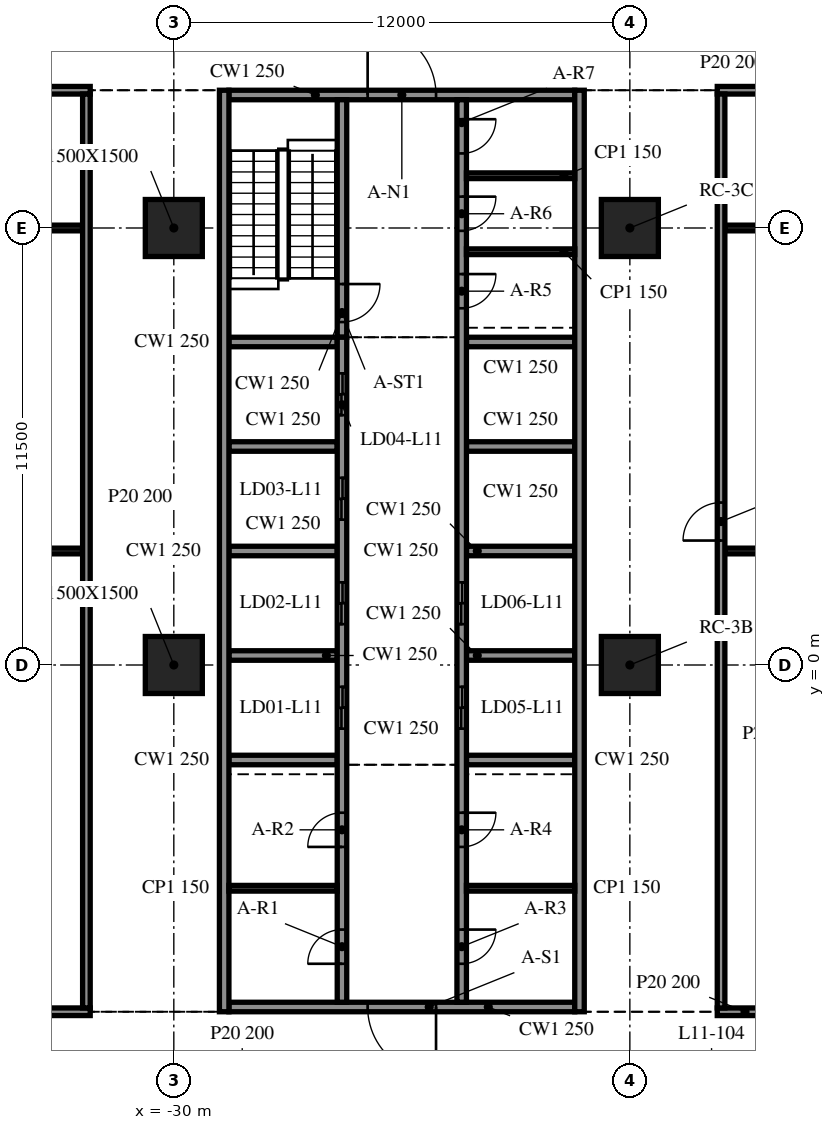
"""IFC4 building model, lengths in metres.
Left out: names, types, materials, properties, quantities, classifications, styles, units other than length and angle.
Written with IfcOpenShell. Run it as: python <this file> out.ifc"""

import sys

from ifc_helpers import new_model, si_unit, direction, frame, frame_2d, origin, origin_2d, place, context, subcontext, project, spatial, rectangle, extrude, element, fill, save


model = new_model("IFC4")
c1 = context("Model", 3, precision=1e-05, world=origin(), true_north=direction((0.0, 1.0)))
c2 = subcontext(c1, "Body", "Model", "MODEL_VIEW")
j1 = project(units=[si_unit("LENGTHUNIT", "METRE"), si_unit("PLANEANGLEUNIT", "RADIAN")], contexts=[c1])
p1 = place(None, origin())
s1 = spatial("IfcSite", under=j1, at=p1, CompositionType="ELEMENT")
p2 = place(p1, origin())
s2 = spatial("IfcBuilding", under=s1, at=p2, CompositionType="ELEMENT")
p3 = place(p2, frame((0.0, 0.0, 50.3)))
s3 = spatial("IfcBuildingStorey", under=s2, at=p3, CompositionType="ELEMENT", Elevation=50.3)
for number, where, z_axis, x_axis in (
    (1, (-30.0, 0.0, -0.34), (0.0, 0.0, 1.0), (1.0, 0.0, 0.0)),
    (2, (-30.0, 11.5, -0.34), (0.0, 0.0, 1.0), (1.0, 0.0, 0.0)),
    (3, (-18.0, 0.0, -0.34), (0.0, 0.0, 1.0), (1.0, 0.0, 0.0)),
    (4, (-18.0, 11.5, -0.34), (0.0, 0.0, 1.0), (1.0, 0.0, 0.0)),
):
    element("IfcColumn", number, at=place(p3, frame(where, z_axis=z_axis, x_axis=x_axis)), inside=s3, PredefinedType="COLUMN", context=c2, shape_type="SweptSolid", body=[
        extrude(rectangle(XDim=1.5, YDim=1.5, at=origin_2d()), origin(), (0.0, 0.0, 1.0), 4.3),
    ])
for number, where, z_axis, x_axis in (
    (5, (-28.675, 15.125, 0.0), (0.0, 0.0, 1.0), (0.0, -1.0, 0.0)),
    (6, (-19.325, -9.125, 0.0), (0.0, 0.0, 1.0), (0.0, 1.0, 0.0)),
):
    element("IfcWall", number, at=place(p3, frame(where, z_axis=z_axis, x_axis=x_axis)), inside=s3, PredefinedType="SOLIDWALL", context=c2, shape_type="SweptSolid", body=[
        extrude(rectangle(XDim=24.25, YDim=0.25, at=frame_2d((12.125, 0.0))), origin(), (0.0, 0.0, 1.0), 3.96),
    ])
p4 = place(p3, frame((-19.45, -9.0, 0.0), z_axis=(0.0, 0.0, 1.0), x_axis=(-1.0, 0.0, 0.0)))
e7 = element("IfcWall", 7, at=p4, inside=s3, PredefinedType="SOLIDWALL", context=c2, shape_type="SweptSolid", body=[
    extrude(rectangle(XDim=9.1, YDim=0.25, at=frame_2d((4.55, 0.0))), origin(), (0.0, 0.0, 1.0), 3.96),
])
p5 = place(p4, frame((3.65, 0.0, 0.0)))
e8 = element("IfcOpeningElement", 8, at=p5, cuts=e7, PredefinedType="OPENING", context=c2, shape_type="SweptSolid", body=[
    extrude(rectangle(XDim=1.8, YDim=2.1, at=frame_2d((0.9, 1.05))), frame((0.0, 0.135, 0.0), z_axis=(0.0, -1.0, 0.0), x_axis=(1.0, 0.0, 0.0)), (0.0, 0.0, 1.0), 0.27),
])
p6 = place(p3, frame((-28.55, 15.0, 0.0), z_axis=(0.0, 0.0, 1.0), x_axis=(1.0, 0.0, 0.0)))
e9 = element("IfcWall", 9, at=p6, inside=s3, PredefinedType="SOLIDWALL", context=c2, shape_type="SweptSolid", body=[
    extrude(rectangle(XDim=9.1, YDim=0.25, at=frame_2d((4.55, 0.0))), origin(), (0.0, 0.0, 1.0), 3.96),
])
p7 = place(p6, frame((3.65, 0.0, 0.0)))
e10 = element("IfcOpeningElement", 10, at=p7, cuts=e9, PredefinedType="OPENING", context=c2, shape_type="SweptSolid", body=[
    extrude(rectangle(XDim=1.8, YDim=2.1, at=frame_2d((0.9, 1.05))), frame((0.0, 0.135, 0.0), z_axis=(0.0, -1.0, 0.0), x_axis=(1.0, 0.0, 0.0)), (0.0, 0.0, 1.0), 0.27),
])
p8 = place(p3, frame((-25.575, -8.875, 0.0), z_axis=(0.0, 0.0, 1.0), x_axis=(0.0, 1.0, 0.0)))
e11 = element("IfcWall", 11, at=p8, inside=s3, PredefinedType="SOLIDWALL", context=c2, shape_type="SweptSolid", body=[
    extrude(rectangle(XDim=17.5, YDim=0.25, at=frame_2d((8.75, 0.0))), origin(), (0.0, 0.0, 1.0), 3.96),
])
p9 = place(p8, frame((7.2, 0.0, 0.0)))
e12 = element("IfcOpeningElement", 12, at=p9, cuts=e11, PredefinedType="OPENING", context=c2, shape_type="SweptSolid", body=[
    extrude(rectangle(XDim=1.1, YDim=2.1, at=frame_2d((0.55, 1.05))), frame((0.0, 0.135, 0.0), z_axis=(0.0, -1.0, 0.0), x_axis=(1.0, 0.0, 0.0)), (0.0, 0.0, 1.0), 0.27),
])
p10 = place(p8, frame((9.95, 0.0, 0.0)))
e13 = element("IfcOpeningElement", 13, at=p10, cuts=e11, PredefinedType="OPENING", context=c2, shape_type="SweptSolid", body=[
    extrude(rectangle(XDim=1.1, YDim=2.1, at=frame_2d((0.55, 1.05))), frame((0.0, 0.135, 0.0), z_axis=(0.0, -1.0, 0.0), x_axis=(1.0, 0.0, 0.0)), (0.0, 0.0, 1.0), 0.27),
])
p11 = place(p8, frame((12.7, 0.0, 0.0)))
e14 = element("IfcOpeningElement", 14, at=p11, cuts=e11, PredefinedType="OPENING", context=c2, shape_type="SweptSolid", body=[
    extrude(rectangle(XDim=1.1, YDim=2.1, at=frame_2d((0.55, 1.05))), frame((0.0, 0.135, 0.0), z_axis=(0.0, -1.0, 0.0), x_axis=(1.0, 0.0, 0.0)), (0.0, 0.0, 1.0), 0.27),
])
p12 = place(p8, frame((15.45, 0.0, 0.0)))
e15 = element("IfcOpeningElement", 15, at=p12, cuts=e11, PredefinedType="OPENING", context=c2, shape_type="SweptSolid", body=[
    extrude(rectangle(XDim=1.1, YDim=2.1, at=frame_2d((0.55, 1.05))), frame((0.0, 0.135, 0.0), z_axis=(0.0, -1.0, 0.0), x_axis=(1.0, 0.0, 0.0)), (0.0, 0.0, 1.0), 0.27),
])
p13 = place(p8, frame((1.012, 0.0, 0.0)))
e16 = element("IfcOpeningElement", 16, at=p13, cuts=e11, PredefinedType="OPENING", context=c2, shape_type="SweptSolid", body=[
    extrude(rectangle(XDim=0.9, YDim=2.1, at=frame_2d((0.45, 1.05))), frame((0.0, 0.135, 0.0), z_axis=(0.0, -1.0, 0.0), x_axis=(1.0, 0.0, 0.0)), (0.0, 0.0, 1.0), 0.27),
])
p14 = place(p8, frame((4.087, 0.0, 0.0)))
e17 = element("IfcOpeningElement", 17, at=p14, cuts=e11, PredefinedType="OPENING", context=c2, shape_type="SweptSolid", body=[
    extrude(rectangle(XDim=0.9, YDim=2.1, at=frame_2d((0.45, 1.05))), frame((0.0, 0.135, 0.0), z_axis=(0.0, -1.0, 0.0), x_axis=(1.0, 0.0, 0.0)), (0.0, 0.0, 1.0), 0.27),
])
p15 = place(p3, frame((-25.575, 14.875, 0.0), z_axis=(0.0, 0.0, 1.0), x_axis=(0.0, -1.0, 0.0)))
e18 = element("IfcWall", 18, at=p15, inside=s3, PredefinedType="SOLIDWALL", context=c2, shape_type="SweptSolid", body=[
    extrude(rectangle(XDim=6.25, YDim=0.25, at=frame_2d((3.125, 0.0))), origin(), (0.0, 0.0, 1.0), 3.96),
])
p16 = place(p15, frame((4.85, 0.0, 0.0)))
e19 = element("IfcOpeningElement", 19, at=p16, cuts=e18, PredefinedType="OPENING", context=c2, shape_type="SweptSolid", body=[
    extrude(rectangle(XDim=1.0, YDim=2.1, at=frame_2d((0.5, 1.05))), frame((0.0, 0.135, 0.0), z_axis=(0.0, -1.0, 0.0), x_axis=(1.0, 0.0, 0.0)), (0.0, 0.0, 1.0), 0.27),
])
p17 = place(p3, frame((-22.425, 14.875, 0.0), z_axis=(0.0, 0.0, 1.0), x_axis=(0.0, -1.0, 0.0)))
e20 = element("IfcWall", 20, at=p17, inside=s3, PredefinedType="SOLIDWALL", context=c2, shape_type="SweptSolid", body=[
    extrude(rectangle(XDim=23.75, YDim=0.25, at=frame_2d((11.875, 0.0))), origin(), (0.0, 0.0, 1.0), 3.96),
])
p18 = place(p17, frame((15.45, 0.0, 0.0)))
e21 = element("IfcOpeningElement", 21, at=p18, cuts=e20, PredefinedType="OPENING", context=c2, shape_type="SweptSolid", body=[
    extrude(rectangle(XDim=1.1, YDim=2.1, at=frame_2d((0.55, 1.05))), frame((0.0, 0.135, 0.0), z_axis=(0.0, -1.0, 0.0), x_axis=(1.0, 0.0, 0.0)), (0.0, 0.0, 1.0), 0.27),
])
p19 = place(p17, frame((12.7, 0.0, 0.0)))
e22 = element("IfcOpeningElement", 22, at=p19, cuts=e20, PredefinedType="OPENING", context=c2, shape_type="SweptSolid", body=[
    extrude(rectangle(XDim=1.1, YDim=2.1, at=frame_2d((0.55, 1.05))), frame((0.0, 0.135, 0.0), z_axis=(0.0, -1.0, 0.0), x_axis=(1.0, 0.0, 0.0)), (0.0, 0.0, 1.0), 0.27),
])
p20 = place(p17, frame((21.837, 0.0, 0.0)))
e23 = element("IfcOpeningElement", 23, at=p20, cuts=e20, PredefinedType="OPENING", context=c2, shape_type="SweptSolid", body=[
    extrude(rectangle(XDim=0.9, YDim=2.1, at=frame_2d((0.45, 1.05))), frame((0.0, 0.135, 0.0), z_axis=(0.0, -1.0, 0.0), x_axis=(1.0, 0.0, 0.0)), (0.0, 0.0, 1.0), 0.27),
])
p21 = place(p17, frame((18.762, 0.0, 0.0)))
e24 = element("IfcOpeningElement", 24, at=p21, cuts=e20, PredefinedType="OPENING", context=c2, shape_type="SweptSolid", body=[
    extrude(rectangle(XDim=0.9, YDim=2.1, at=frame_2d((0.45, 1.05))), frame((0.0, 0.135, 0.0), z_axis=(0.0, -1.0, 0.0), x_axis=(1.0, 0.0, 0.0)), (0.0, 0.0, 1.0), 0.27),
])
p22 = place(p17, frame((4.587, 0.0, 0.0)))
e25 = element("IfcOpeningElement", 25, at=p22, cuts=e20, PredefinedType="OPENING", context=c2, shape_type="SweptSolid", body=[
    extrude(rectangle(XDim=0.9, YDim=2.1, at=frame_2d((0.45, 1.05))), frame((0.0, 0.135, 0.0), z_axis=(0.0, -1.0, 0.0), x_axis=(1.0, 0.0, 0.0)), (0.0, 0.0, 1.0), 0.27),
])
p23 = place(p17, frame((2.55, 0.0, 0.0)))
e26 = element("IfcOpeningElement", 26, at=p23, cuts=e20, PredefinedType="OPENING", context=c2, shape_type="SweptSolid", body=[
    extrude(rectangle(XDim=0.9, YDim=2.1, at=frame_2d((0.45, 1.05))), frame((0.0, 0.135, 0.0), z_axis=(0.0, -1.0, 0.0), x_axis=(1.0, 0.0, 0.0)), (0.0, 0.0, 1.0), 0.27),
])
p24 = place(p17, frame((0.512, 0.0, 0.0)))
e27 = element("IfcOpeningElement", 27, at=p24, cuts=e20, PredefinedType="OPENING", context=c2, shape_type="SweptSolid", body=[
    extrude(rectangle(XDim=0.9, YDim=2.1, at=frame_2d((0.45, 1.05))), frame((0.0, 0.135, 0.0), z_axis=(0.0, -1.0, 0.0), x_axis=(1.0, 0.0, 0.0)), (0.0, 0.0, 1.0), 0.27),
])
for number, where, z_axis, x_axis in (
    (28, (-28.55, -2.5, 0.0), (0.0, 0.0, 1.0), (1.0, 0.0, 0.0)),
    (29, (-28.55, 0.25, 0.0), (0.0, 0.0, 1.0), (1.0, 0.0, 0.0)),
    (30, (-28.55, 3.0, 0.0), (0.0, 0.0, 1.0), (1.0, 0.0, 0.0)),
    (31, (-28.55, 5.75, 0.0), (0.0, 0.0, 1.0), (1.0, 0.0, 0.0)),
    (32, (-28.55, 8.5, 0.0), (0.0, 0.0, 1.0), (1.0, 0.0, 0.0)),
    (33, (-22.3, -2.5, 0.0), (0.0, 0.0, 1.0), (1.0, 0.0, 0.0)),
    (34, (-22.3, 0.25, 0.0), (0.0, 0.0, 1.0), (1.0, 0.0, 0.0)),
    (35, (-22.3, 3.0, 0.0), (0.0, 0.0, 1.0), (1.0, 0.0, 0.0)),
    (36, (-22.3, 5.75, 0.0), (0.0, 0.0, 1.0), (1.0, 0.0, 0.0)),
    (37, (-22.3, 8.5, 0.0), (0.0, 0.0, 1.0), (1.0, 0.0, 0.0)),
):
    element("IfcWall", number, at=place(p3, frame(where, z_axis=z_axis, x_axis=x_axis)), inside=s3, PredefinedType="SOLIDWALL", context=c2, shape_type="SweptSolid", body=[
        extrude(rectangle(XDim=2.85, YDim=0.25, at=frame_2d((1.425, 0.0))), origin(), (0.0, 0.0, 1.0), 3.96),
    ])
for number, where, z_axis, x_axis in (
    (38, (-28.55, -5.875, 0.0), (0.0, 0.0, 1.0), (1.0, 0.0, 0.0)),
    (39, (-22.3, -5.875, 0.0), (0.0, 0.0, 1.0), (1.0, 0.0, 0.0)),
    (40, (-22.3, 10.875, 0.0), (0.0, 0.0, 1.0), (1.0, 0.0, 0.0)),
    (41, (-22.3, 12.875, 0.0), (0.0, 0.0, 1.0), (1.0, 0.0, 0.0)),
):
    element("IfcWall", number, at=place(p3, frame(where, z_axis=z_axis, x_axis=x_axis)), inside=s3, PredefinedType="PARTITIONING", context=c2, shape_type="SweptSolid", body=[
        extrude(rectangle(XDim=2.85, YDim=0.15, at=frame_2d((1.425, 0.0))), origin(), (0.0, 0.0, 1.0), 3.96),
    ])
p25 = place(p3, frame((-39.95, -9.125, 0.0), z_axis=(0.0, 0.0, 1.0), x_axis=(1.0, 0.0, 0.0)))
e42 = element("IfcWall", 42, at=p25, inside=s3, PredefinedType="PARTITIONING", context=c2, shape_type="SweptSolid", body=[
    extrude(rectangle(XDim=7.75, YDim=0.2, at=frame_2d((3.875, 0.0))), origin(), (0.0, 0.0, 1.0), 3.96),
])
p26 = place(p25, frame((3.3, 0.0, 0.0)))
e43 = element("IfcOpeningElement", 43, at=p26, cuts=e42, PredefinedType="OPENING", context=c2, shape_type="SweptSolid", body=[
    extrude(rectangle(XDim=1.2, YDim=2.1, at=frame_2d((0.6, 1.05))), frame((0.0, 0.11, 0.0), z_axis=(0.0, -1.0, 0.0), x_axis=(1.0, 0.0, 0.0)), (0.0, 0.0, 1.0), 0.22),
])
p27 = place(p3, frame((-15.7, -9.125, 0.0), z_axis=(0.0, 0.0, 1.0), x_axis=(1.0, 0.0, 0.0)))
e44 = element("IfcWall", 44, at=p27, inside=s3, PredefinedType="PARTITIONING", context=c2, shape_type="SweptSolid", body=[
    extrude(rectangle(XDim=7.3, YDim=0.2, at=frame_2d((3.65, 0.0))), origin(), (0.0, 0.0, 1.0), 3.96),
])
p28 = place(p27, frame((3.1, 0.0, 0.0)))
e45 = element("IfcOpeningElement", 45, at=p28, cuts=e44, PredefinedType="OPENING", context=c2, shape_type="SweptSolid", body=[
    extrude(rectangle(XDim=1.0, YDim=2.1, at=frame_2d((0.5, 1.05))), frame((0.0, 0.11, 0.0), z_axis=(0.0, -1.0, 0.0), x_axis=(1.0, 0.0, 0.0)), (0.0, 0.0, 1.0), 0.22),
])
p29 = place(p3, frame((-39.75, 3.0, 0.0), z_axis=(0.0, 0.0, 1.0), x_axis=(1.0, 0.0, 0.0)))
e46 = element("IfcWall", 46, at=p29, inside=s3, PredefinedType="PARTITIONING", context=c2, shape_type="SweptSolid", body=[
    extrude(rectangle(XDim=7.35, YDim=0.15, at=frame_2d((3.675, 0.0))), origin(), (0.0, 0.0, 1.0), 3.96),
])
p30 = place(p3, frame((-15.5, 3.0, 0.0), z_axis=(0.0, 0.0, 1.0), x_axis=(1.0, 0.0, 0.0)))
e47 = element("IfcWall", 47, at=p30, inside=s3, PredefinedType="PARTITIONING", context=c2, shape_type="SweptSolid", body=[
    extrude(rectangle(XDim=6.9, YDim=0.15, at=frame_2d((3.45, 0.0))), origin(), (0.0, 0.0, 1.0), 3.96),
])
p31 = place(p3, frame((-39.75, 11.5, 0.0), z_axis=(0.0, 0.0, 1.0), x_axis=(1.0, 0.0, 0.0)))
e48 = element("IfcWall", 48, at=p31, inside=s3, PredefinedType="PARTITIONING", context=c2, shape_type="SweptSolid", body=[
    extrude(rectangle(XDim=7.35, YDim=0.15, at=frame_2d((3.675, 0.0))), origin(), (0.0, 0.0, 1.0), 3.96),
])
p32 = place(p3, frame((-15.5, 11.5, 0.0), z_axis=(0.0, 0.0, 1.0), x_axis=(1.0, 0.0, 0.0)))
e49 = element("IfcWall", 49, at=p32, inside=s3, PredefinedType="PARTITIONING", context=c2, shape_type="SweptSolid", body=[
    extrude(rectangle(XDim=6.9, YDim=0.15, at=frame_2d((3.45, 0.0))), origin(), (0.0, 0.0, 1.0), 3.96),
])
p33 = place(p3, frame((-39.95, 15.125, 0.0), z_axis=(0.0, 0.0, 1.0), x_axis=(1.0, 0.0, 0.0)))
e50 = element("IfcWall", 50, at=p33, inside=s3, PredefinedType="PARTITIONING", context=c2, shape_type="SweptSolid", body=[
    extrude(rectangle(XDim=7.75, YDim=0.2, at=frame_2d((3.875, 0.0))), origin(), (0.0, 0.0, 1.0), 3.96),
])
p34 = place(p33, frame((3.3, 0.0, 0.0)))
e51 = element("IfcOpeningElement", 51, at=p34, cuts=e50, PredefinedType="OPENING", context=c2, shape_type="SweptSolid", body=[
    extrude(rectangle(XDim=1.2, YDim=2.1, at=frame_2d((0.6, 1.05))), frame((0.0, 0.11, 0.0), z_axis=(0.0, -1.0, 0.0), x_axis=(1.0, 0.0, 0.0)), (0.0, 0.0, 1.0), 0.22),
])
p35 = place(p3, frame((-15.7, 15.125, 0.0), z_axis=(0.0, 0.0, 1.0), x_axis=(1.0, 0.0, 0.0)))
e52 = element("IfcWall", 52, at=p35, inside=s3, PredefinedType="PARTITIONING", context=c2, shape_type="SweptSolid", body=[
    extrude(rectangle(XDim=7.3, YDim=0.2, at=frame_2d((3.65, 0.0))), origin(), (0.0, 0.0, 1.0), 3.96),
])
p36 = place(p35, frame((3.1, 0.0, 0.0)))
e53 = element("IfcOpeningElement", 53, at=p36, cuts=e52, PredefinedType="OPENING", context=c2, shape_type="SweptSolid", body=[
    extrude(rectangle(XDim=1.0, YDim=2.1, at=frame_2d((0.5, 1.05))), frame((0.0, 0.11, 0.0), z_axis=(0.0, -1.0, 0.0), x_axis=(1.0, 0.0, 0.0)), (0.0, 0.0, 1.0), 0.22),
])
p37 = place(p3, frame((-32.3, -9.025, 0.0), z_axis=(0.0, 0.0, 1.0), x_axis=(0.0, 1.0, 0.0)))
e54 = element("IfcWall", 54, at=p37, inside=s3, PredefinedType="PARTITIONING", context=c2, shape_type="SweptSolid", body=[
    extrude(rectangle(XDim=24.05, YDim=0.2, at=frame_2d((12.025, 0.0))), origin(), (0.0, 0.0, 1.0), 3.96),
])
p38 = place(p3, frame((-15.6, -9.025, 0.0), z_axis=(0.0, 0.0, 1.0), x_axis=(0.0, 1.0, 0.0)))
e55 = element("IfcWall", 55, at=p38, inside=s3, PredefinedType="PARTITIONING", context=c2, shape_type="SweptSolid", body=[
    extrude(rectangle(XDim=24.05, YDim=0.2, at=frame_2d((12.025, 0.0))), origin(), (0.0, 0.0, 1.0), 3.96),
])
p39 = place(p38, frame((12.3, 0.0, 0.0)))
e56 = element("IfcOpeningElement", 56, at=p39, cuts=e55, PredefinedType="OPENING", context=c2, shape_type="SweptSolid", body=[
    extrude(rectangle(XDim=1.0, YDim=2.1, at=frame_2d((0.5, 1.05))), frame((0.0, 0.11, 0.0), z_axis=(0.0, -1.0, 0.0), x_axis=(1.0, 0.0, 0.0)), (0.0, 0.0, 1.0), 0.22),
])
p40 = place(p5, origin())
e57 = element("IfcDoor", 57, at=p40, inside=s3, OperationType="DOUBLE_DOOR_SINGLE_SWING", PredefinedType="DOOR", context=c2, shape_type="SweptSolid", body=[
    extrude(rectangle(XDim=1.8, YDim=2.1, at=frame_2d((0.9, 1.05))), frame((0.0, 0.025, 0.0), z_axis=(0.0, -1.0, 0.0), x_axis=(1.0, 0.0, 0.0)), (0.0, 0.0, 1.0), 0.05),
])
fill(e8, e57)
p41 = place(p7, origin())
e58 = element("IfcDoor", 58, at=p41, inside=s3, OperationType="DOUBLE_DOOR_SINGLE_SWING", PredefinedType="DOOR", context=c2, shape_type="SweptSolid", body=[
    extrude(rectangle(XDim=1.8, YDim=2.1, at=frame_2d((0.9, 1.05))), frame((0.0, 0.025, 0.0), z_axis=(0.0, -1.0, 0.0), x_axis=(1.0, 0.0, 0.0)), (0.0, 0.0, 1.0), 0.05),
])
fill(e10, e58)
p42 = place(p18, origin())
e59 = element("IfcDoor", 59, at=p42, inside=s3, OperationType="DOUBLE_DOOR_SLIDING", PredefinedType="DOOR", context=c2, shape_type="SweptSolid", body=[
    extrude(rectangle(XDim=1.1, YDim=2.1, at=frame_2d((0.55, 1.05))), frame((0.0, 0.025, 0.0), z_axis=(0.0, -1.0, 0.0), x_axis=(1.0, 0.0, 0.0)), (0.0, 0.0, 1.0), 0.05),
])
fill(e21, e59)
p43 = place(p19, origin())
e60 = element("IfcDoor", 60, at=p43, inside=s3, OperationType="DOUBLE_DOOR_SLIDING", PredefinedType="DOOR", context=c2, shape_type="SweptSolid", body=[
    extrude(rectangle(XDim=1.1, YDim=2.1, at=frame_2d((0.55, 1.05))), frame((0.0, 0.025, 0.0), z_axis=(0.0, -1.0, 0.0), x_axis=(1.0, 0.0, 0.0)), (0.0, 0.0, 1.0), 0.05),
])
fill(e22, e60)
p44 = place(p9, origin())
e61 = element("IfcDoor", 61, at=p44, inside=s3, OperationType="DOUBLE_DOOR_SLIDING", PredefinedType="DOOR", context=c2, shape_type="SweptSolid", body=[
    extrude(rectangle(XDim=1.1, YDim=2.1, at=frame_2d((0.55, 1.05))), frame((0.0, 0.025, 0.0), z_axis=(0.0, -1.0, 0.0), x_axis=(1.0, 0.0, 0.0)), (0.0, 0.0, 1.0), 0.05),
])
fill(e12, e61)
p45 = place(p10, origin())
e62 = element("IfcDoor", 62, at=p45, inside=s3, OperationType="DOUBLE_DOOR_SLIDING", PredefinedType="DOOR", context=c2, shape_type="SweptSolid", body=[
    extrude(rectangle(XDim=1.1, YDim=2.1, at=frame_2d((0.55, 1.05))), frame((0.0, 0.025, 0.0), z_axis=(0.0, -1.0, 0.0), x_axis=(1.0, 0.0, 0.0)), (0.0, 0.0, 1.0), 0.05),
])
fill(e13, e62)
p46 = place(p11, origin())
e63 = element("IfcDoor", 63, at=p46, inside=s3, OperationType="DOUBLE_DOOR_SLIDING", PredefinedType="DOOR", context=c2, shape_type="SweptSolid", body=[
    extrude(rectangle(XDim=1.1, YDim=2.1, at=frame_2d((0.55, 1.05))), frame((0.0, 0.025, 0.0), z_axis=(0.0, -1.0, 0.0), x_axis=(1.0, 0.0, 0.0)), (0.0, 0.0, 1.0), 0.05),
])
fill(e14, e63)
p47 = place(p12, origin())
e64 = element("IfcDoor", 64, at=p47, inside=s3, OperationType="DOUBLE_DOOR_SLIDING", PredefinedType="DOOR", context=c2, shape_type="SweptSolid", body=[
    extrude(rectangle(XDim=1.1, YDim=2.1, at=frame_2d((0.55, 1.05))), frame((0.0, 0.025, 0.0), z_axis=(0.0, -1.0, 0.0), x_axis=(1.0, 0.0, 0.0)), (0.0, 0.0, 1.0), 0.05),
])
fill(e15, e64)
p48 = place(p13, origin())
e65 = element("IfcDoor", 65, at=p48, inside=s3, OperationType="SINGLE_SWING_LEFT", PredefinedType="DOOR", context=c2, shape_type="SweptSolid", body=[
    extrude(rectangle(XDim=0.9, YDim=2.1, at=frame_2d((0.45, 1.05))), frame((0.0, 0.025, 0.0), z_axis=(0.0, -1.0, 0.0), x_axis=(1.0, 0.0, 0.0)), (0.0, 0.0, 1.0), 0.05),
])
fill(e16, e65)
p49 = place(p14, origin())
e66 = element("IfcDoor", 66, at=p49, inside=s3, OperationType="SINGLE_SWING_RIGHT", PredefinedType="DOOR", context=c2, shape_type="SweptSolid", body=[
    extrude(rectangle(XDim=0.9, YDim=2.1, at=frame_2d((0.45, 1.05))), frame((0.0, 0.025, 0.0), z_axis=(0.0, -1.0, 0.0), x_axis=(1.0, 0.0, 0.0)), (0.0, 0.0, 1.0), 0.05),
])
fill(e17, e66)
p50 = place(p20, origin())
e67 = element("IfcDoor", 67, at=p50, inside=s3, OperationType="SINGLE_SWING_LEFT", PredefinedType="DOOR", context=c2, shape_type="SweptSolid", body=[
    extrude(rectangle(XDim=0.9, YDim=2.1, at=frame_2d((0.45, 1.05))), frame((0.0, 0.025, 0.0), z_axis=(0.0, -1.0, 0.0), x_axis=(1.0, 0.0, 0.0)), (0.0, 0.0, 1.0), 0.05),
])
fill(e23, e67)
p51 = place(p21, origin())
e68 = element("IfcDoor", 68, at=p51, inside=s3, OperationType="SINGLE_SWING_RIGHT", PredefinedType="DOOR", context=c2, shape_type="SweptSolid", body=[
    extrude(rectangle(XDim=0.9, YDim=2.1, at=frame_2d((0.45, 1.05))), frame((0.0, 0.025, 0.0), z_axis=(0.0, -1.0, 0.0), x_axis=(1.0, 0.0, 0.0)), (0.0, 0.0, 1.0), 0.05),
])
fill(e24, e68)
p52 = place(p22, origin())
e69 = element("IfcDoor", 69, at=p52, inside=s3, OperationType="SINGLE_SWING_LEFT", PredefinedType="DOOR", context=c2, shape_type="SweptSolid", body=[
    extrude(rectangle(XDim=0.9, YDim=2.1, at=frame_2d((0.45, 1.05))), frame((0.0, 0.025, 0.0), z_axis=(0.0, -1.0, 0.0), x_axis=(1.0, 0.0, 0.0)), (0.0, 0.0, 1.0), 0.05),
])
fill(e25, e69)
p53 = place(p23, origin())
e70 = element("IfcDoor", 70, at=p53, inside=s3, OperationType="SINGLE_SWING_RIGHT", PredefinedType="DOOR", context=c2, shape_type="SweptSolid", body=[
    extrude(rectangle(XDim=0.9, YDim=2.1, at=frame_2d((0.45, 1.05))), frame((0.0, 0.025, 0.0), z_axis=(0.0, -1.0, 0.0), x_axis=(1.0, 0.0, 0.0)), (0.0, 0.0, 1.0), 0.05),
])
fill(e26, e70)
p54 = place(p24, origin())
e71 = element("IfcDoor", 71, at=p54, inside=s3, OperationType="SINGLE_SWING_LEFT", PredefinedType="DOOR", context=c2, shape_type="SweptSolid", body=[
    extrude(rectangle(XDim=0.9, YDim=2.1, at=frame_2d((0.45, 1.05))), frame((0.0, 0.025, 0.0), z_axis=(0.0, -1.0, 0.0), x_axis=(1.0, 0.0, 0.0)), (0.0, 0.0, 1.0), 0.05),
])
fill(e27, e71)
p55 = place(p16, origin())
e72 = element("IfcDoor", 72, at=p55, inside=s3, OperationType="SINGLE_SWING_RIGHT", PredefinedType="DOOR", context=c2, shape_type="SweptSolid", body=[
    extrude(rectangle(XDim=1.0, YDim=2.1, at=frame_2d((0.5, 1.05))), frame((0.0, 0.025, 0.0), z_axis=(0.0, -1.0, 0.0), x_axis=(1.0, 0.0, 0.0)), (0.0, 0.0, 1.0), 0.05),
])
fill(e19, e72)
p56 = place(p39, origin())
e73 = element("IfcDoor", 73, at=p56, inside=s3, OperationType="SINGLE_SWING_LEFT", PredefinedType="DOOR", context=c2, shape_type="SweptSolid", body=[
    extrude(rectangle(XDim=1.0, YDim=2.1, at=frame_2d((0.5, 1.05))), frame((0.0, 0.025, 0.0), z_axis=(0.0, -1.0, 0.0), x_axis=(1.0, 0.0, 0.0)), (0.0, 0.0, 1.0), 0.05),
])
fill(e56, e73)
save(model, sys.argv[1])
